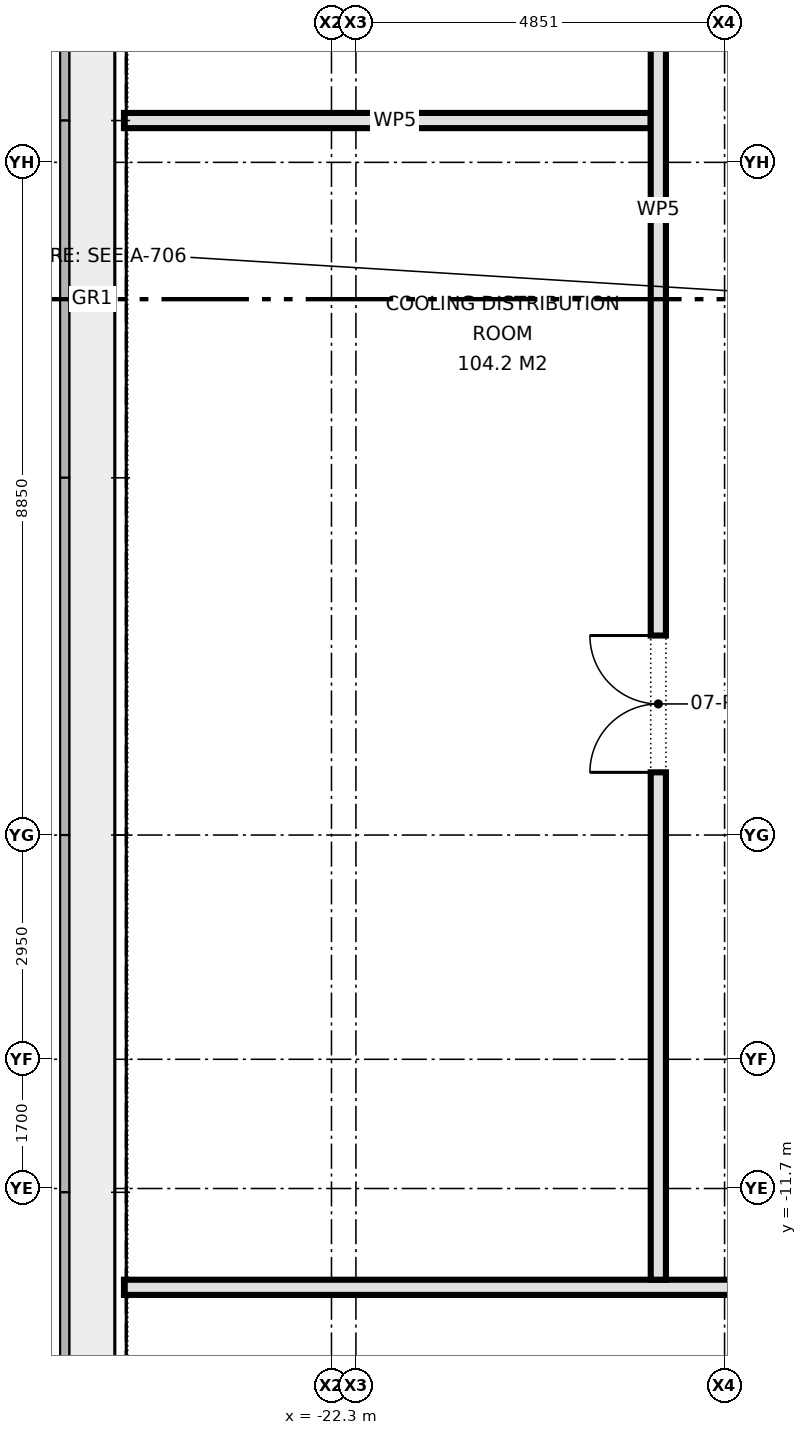
"""IFC4 building model, lengths in metres.
Left out: names, types, materials, properties, quantities, classifications, styles, units other than length and angle.
Written with IfcOpenShell. Run it as: python <this file> out.ifc"""

import sys

from ifc_helpers import new_model, si_unit, direction, frame, frame_2d, origin, place, context, subcontext, project, spatial, rectangle, extrude, element, fill, save


model = new_model("IFC4")
c1 = context("Model", 3, precision=1e-05, world=origin(), true_north=direction((0.0, 1.0)))
c2 = subcontext(c1, "Body", "Model", "MODEL_VIEW")
j1 = project(units=[si_unit("LENGTHUNIT", "METRE"), si_unit("PLANEANGLEUNIT", "RADIAN")], contexts=[c1])
p1 = place(None, origin())
s1 = spatial("IfcSite", under=j1, at=p1, CompositionType="ELEMENT")
p2 = place(p1, origin())
s2 = spatial("IfcBuilding", under=s1, at=p2, CompositionType="ELEMENT")
p3 = place(p2, frame((0.0, 0.0, 30.5)))
s3 = spatial("IfcBuildingStorey", under=s2, at=p3, CompositionType="ELEMENT", Elevation=30.5)
p4 = place(p3, frame((-25.03, -13.0, 0.0), z_axis=(0.0, 0.0, 1.0), x_axis=(1.0, 0.0, 0.0)))
e1 = element("IfcWall", 1, at=p4, inside=s3, PredefinedType="PARTITIONING", context=c2, shape_type="SweptSolid", body=[
    extrude(rectangle(XDim=50.06, YDim=0.2, at=frame_2d((25.03, 0.0))), origin(), (0.0, 0.0, 1.0), 4.575),
])
p5 = place(p4, frame((9.25, 0.0, 0.0)))
e2 = element("IfcOpeningElement", 2, at=p5, cuts=e1, PredefinedType="OPENING", context=c2, shape_type="SweptSolid", body=[
    extrude(rectangle(XDim=1.8, YDim=2.1, at=frame_2d((0.9, 1.05))), frame((0.0, 0.11, 0.0), z_axis=(0.0, -1.0, 0.0), x_axis=(1.0, 0.0, 0.0)), (0.0, 0.0, 1.0), 0.22),
])
p6 = place(p4, frame((17.08, 0.0, 0.0)))
e3 = element("IfcOpeningElement", 3, at=p6, cuts=e1, PredefinedType="OPENING", context=c2, shape_type="SweptSolid", body=[
    extrude(rectangle(XDim=1.8, YDim=2.1, at=frame_2d((0.9, 1.05))), frame((0.0, 0.11, 0.0), z_axis=(0.0, -1.0, 0.0), x_axis=(1.0, 0.0, 0.0)), (0.0, 0.0, 1.0), 0.22),
])
p7 = place(p4, frame((36.06, 0.0, 0.0)))
e4 = element("IfcOpeningElement", 4, at=p7, cuts=e1, PredefinedType="OPENING", context=c2, shape_type="SweptSolid", body=[
    extrude(rectangle(XDim=1.8, YDim=2.1, at=frame_2d((0.9, 1.05))), frame((0.0, 0.11, 0.0), z_axis=(0.0, -1.0, 0.0), x_axis=(1.0, 0.0, 0.0)), (0.0, 0.0, 1.0), 0.22),
])
p8 = place(p4, frame((23.68, 0.0, 0.0)))
e5 = element("IfcOpeningElement", 5, at=p8, cuts=e1, PredefinedType="OPENING", context=c2, shape_type="SweptSolid", body=[
    extrude(rectangle(XDim=1.0, YDim=2.1, at=frame_2d((0.5, 1.05))), frame((0.0, 0.11, 0.0), z_axis=(0.0, -1.0, 0.0), x_axis=(1.0, 0.0, 0.0)), (0.0, 0.0, 1.0), 0.22),
])
p9 = place(p4, frame((26.68, 0.0, 0.0)))
e6 = element("IfcOpeningElement", 6, at=p9, cuts=e1, PredefinedType="OPENING", context=c2, shape_type="SweptSolid", body=[
    extrude(rectangle(XDim=1.0, YDim=2.1, at=frame_2d((0.5, 1.05))), frame((0.0, 0.11, 0.0), z_axis=(0.0, -1.0, 0.0), x_axis=(1.0, 0.0, 0.0)), (0.0, 0.0, 1.0), 0.22),
])
p10 = place(p4, frame((29.28, 0.0, 0.0)))
e7 = element("IfcOpeningElement", 7, at=p10, cuts=e1, PredefinedType="OPENING", context=c2, shape_type="SweptSolid", body=[
    extrude(rectangle(XDim=1.0, YDim=2.1, at=frame_2d((0.5, 1.05))), frame((0.0, 0.11, 0.0), z_axis=(0.0, -1.0, 0.0), x_axis=(1.0, 0.0, 0.0)), (0.0, 0.0, 1.0), 0.22),
])
p11 = place(p3, frame((-25.03, 2.35, 0.0), z_axis=(0.0, 0.0, 1.0), x_axis=(1.0, 0.0, 0.0)))
e8 = element("IfcWall", 8, at=p11, inside=s3, PredefinedType="PARTITIONING", context=c2, shape_type="SweptSolid", body=[
    extrude(rectangle(XDim=6.93, YDim=0.2, at=frame_2d((3.465, 0.0))), origin(), (0.0, 0.0, 1.0), 4.575),
])
p12 = place(p3, frame((-18.0, -12.9, 0.0), z_axis=(0.0, 0.0, 1.0), x_axis=(0.0, 1.0, 0.0)))
e9 = element("IfcWall", 9, at=p12, inside=s3, PredefinedType="PARTITIONING", context=c2, shape_type="SweptSolid", body=[
    extrude(rectangle(XDim=30.3, YDim=0.2, at=frame_2d((15.15, 0.0))), origin(), (0.0, 0.0, 1.0), 4.575),
])
p13 = place(p12, frame((6.675, 0.0, 0.0)))
e10 = element("IfcOpeningElement", 10, at=p13, cuts=e9, PredefinedType="OPENING", context=c2, shape_type="SweptSolid", body=[
    extrude(rectangle(XDim=1.8, YDim=2.1, at=frame_2d((0.9, 1.05))), frame((0.0, 0.11, 0.0), z_axis=(0.0, -1.0, 0.0), x_axis=(1.0, 0.0, 0.0)), (0.0, 0.0, 1.0), 0.22),
])
p14 = place(p12, frame((19.675, 0.0, 0.0)))
e11 = element("IfcOpeningElement", 11, at=p14, cuts=e9, PredefinedType="OPENING", context=c2, shape_type="SweptSolid", body=[
    extrude(rectangle(XDim=1.8, YDim=2.1, at=frame_2d((0.9, 1.05))), frame((0.0, 0.11, 0.0), z_axis=(0.0, -1.0, 0.0), x_axis=(1.0, 0.0, 0.0)), (0.0, 0.0, 1.0), 0.22),
])
p15 = place(p13, origin())
e12 = element("IfcDoor", 12, at=p15, inside=s3, OperationType="DOUBLE_DOOR_SINGLE_SWING", PredefinedType="DOOR", context=c2, shape_type="SweptSolid", body=[
    extrude(rectangle(XDim=1.8, YDim=2.1, at=frame_2d((0.9, 1.05))), frame((0.0, 0.025, 0.0), z_axis=(0.0, -1.0, 0.0), x_axis=(1.0, 0.0, 0.0)), (0.0, 0.0, 1.0), 0.05),
])
fill(e10, e12)
save(model, sys.argv[1])
